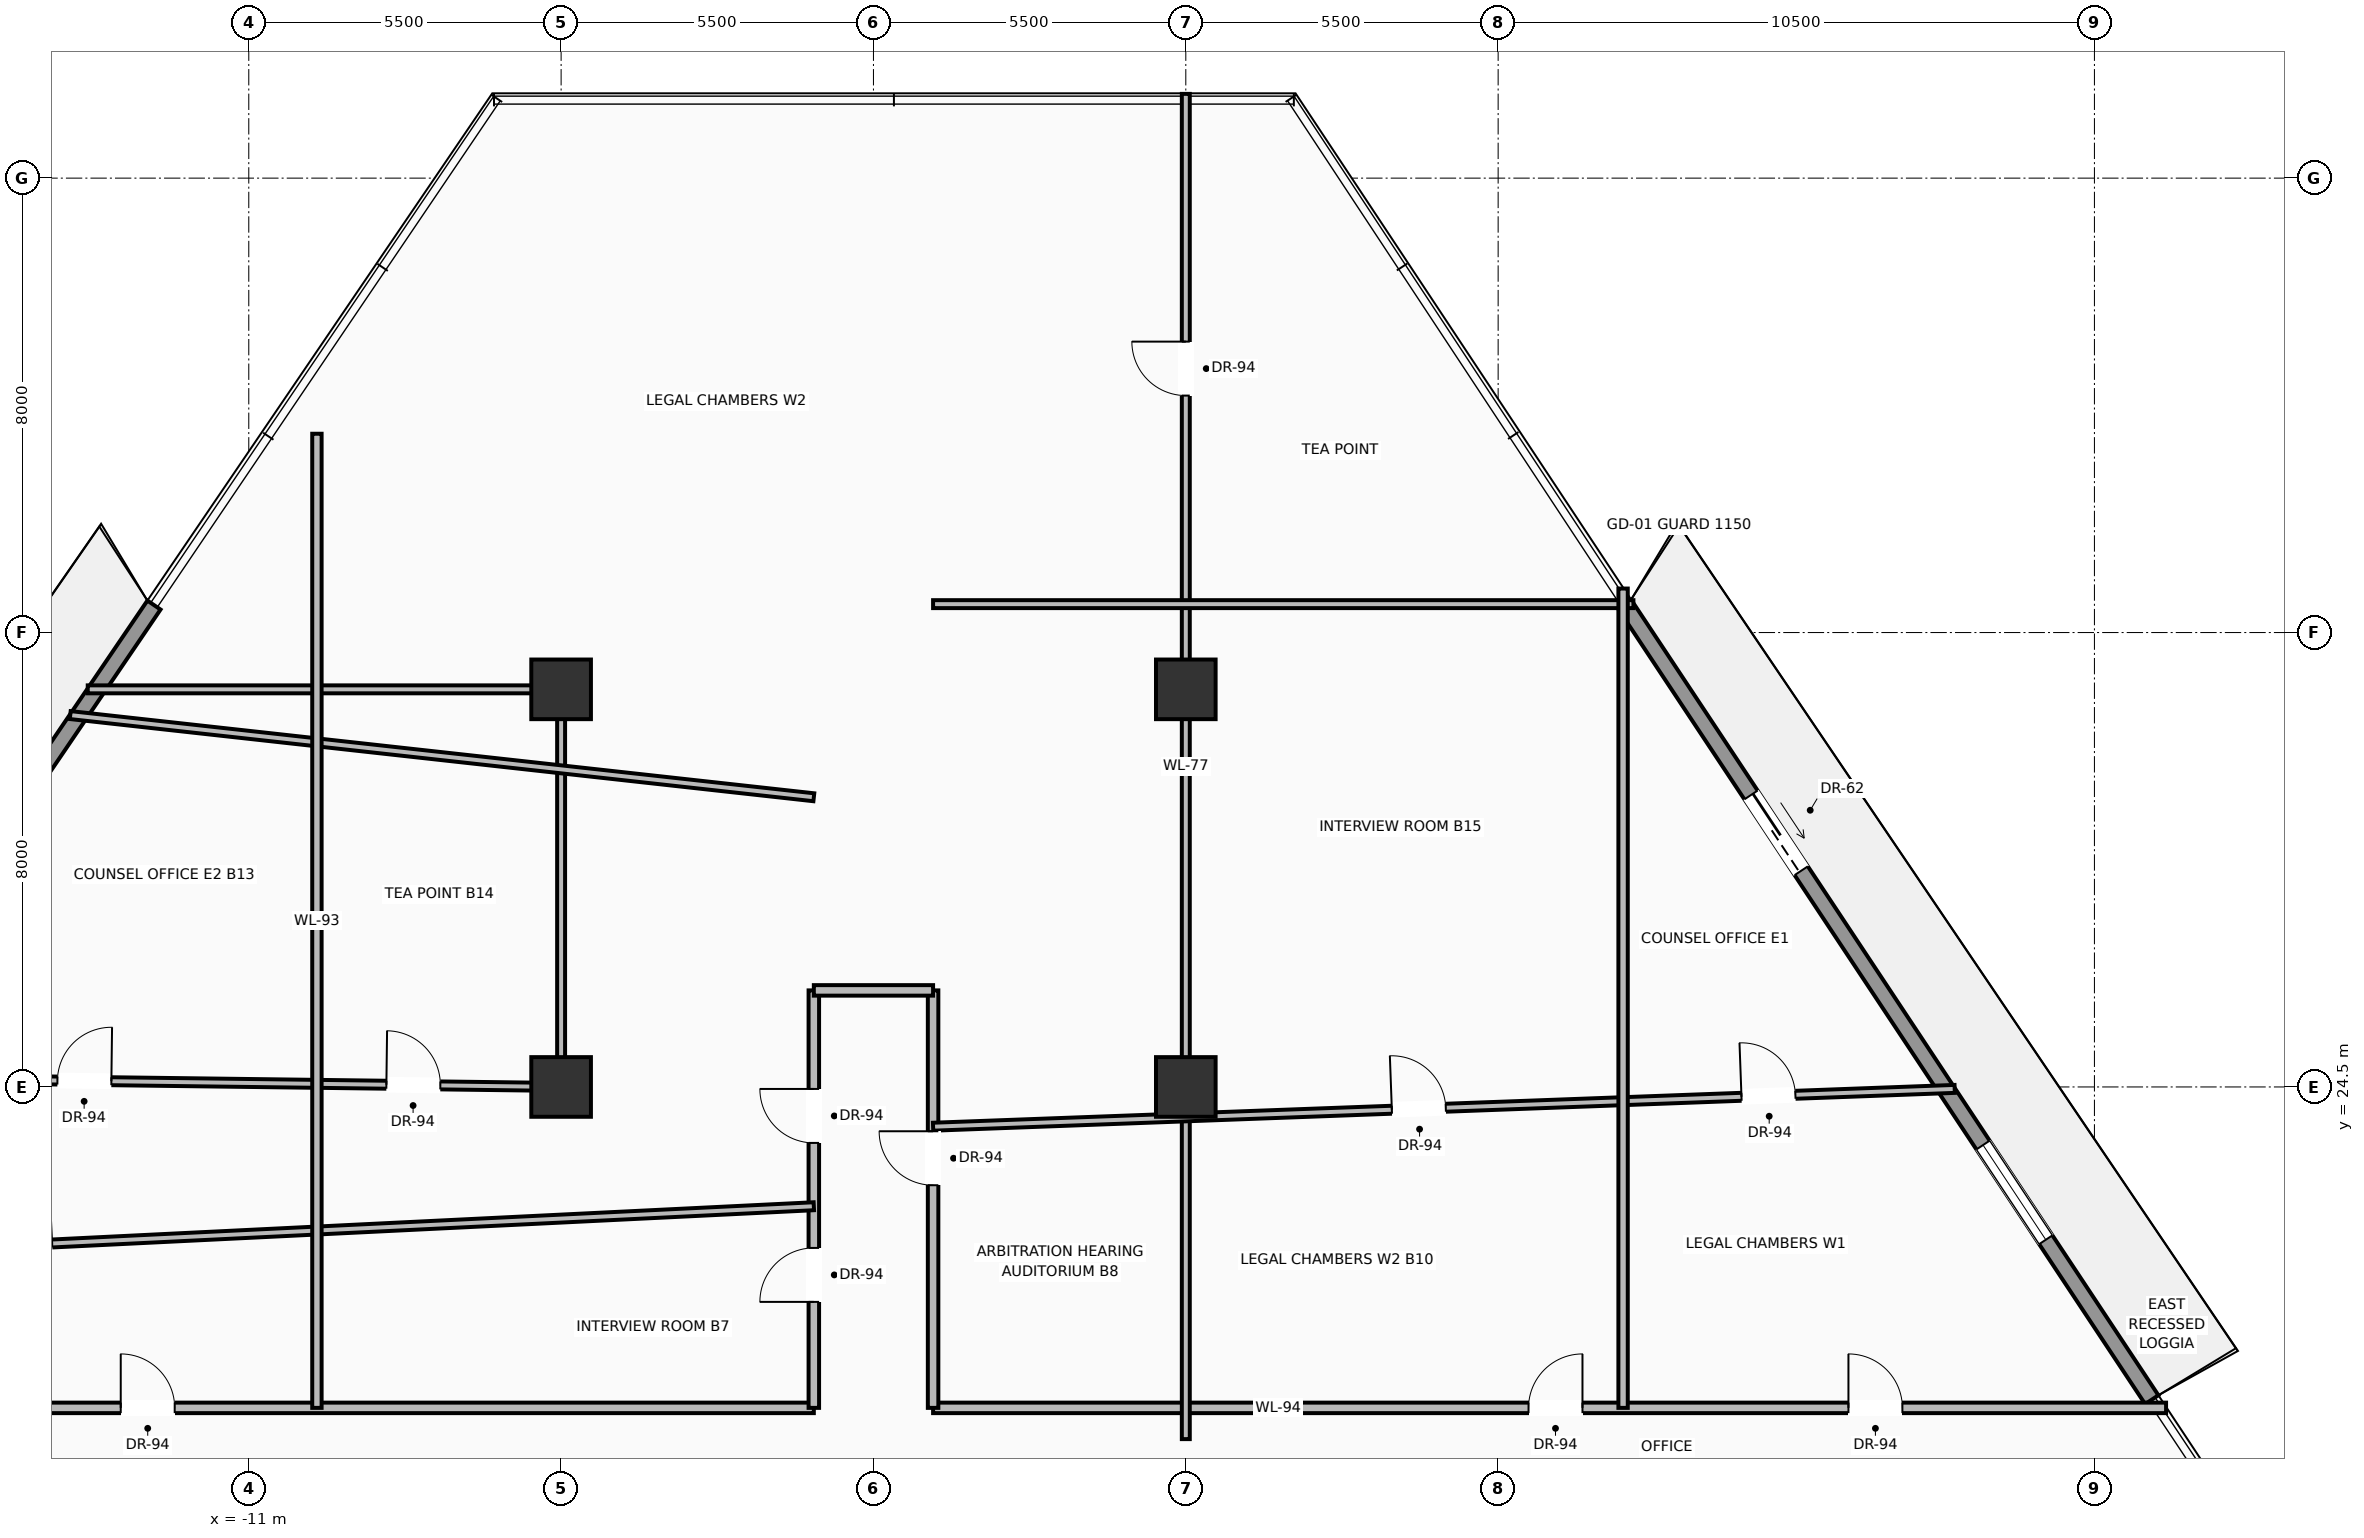
"""IFC4 building model, lengths in metres.
Left out: names, types, materials, properties, quantities, classifications, styles, units other than length and angle.
Written with IfcOpenShell. Run it as: python <this file> out.ifc"""

import sys

from ifc_helpers import new_model, si_unit, direction, frame, frame_2d, origin, origin_2d, place, context, subcontext, project, spatial, rectangle, extrude, source, transform, mapped, element, fill, save


model = new_model("IFC4")
c1 = context("Model", 3, precision=1e-05, world=origin(), true_north=direction((0.0, 1.0)))
c2 = subcontext(c1, "Body", "Model", "MODEL_VIEW")
j1 = project(units=[si_unit("LENGTHUNIT", "METRE"), si_unit("PLANEANGLEUNIT", "RADIAN")], contexts=[c1])
p1 = place(None, origin())
s1 = spatial("IfcSite", under=j1, at=p1, CompositionType="ELEMENT")
p2 = place(p1, origin())
s2 = spatial("IfcBuilding", under=s1, at=p2, CompositionType="ELEMENT")
p3 = place(p2, frame((0.0, 0.0, 60.8)))
s3 = spatial("IfcBuildingStorey", under=s2, at=p3, CompositionType="ELEMENT", Elevation=60.8)
m1 = source(origin(), c2, "Body", "SweptSolid", [
    extrude(rectangle(XDim=1.05, YDim=1.05, at=origin_2d()), origin(), (0.0, 0.0, 1.0), 3.7),
])
for number, where, z_axis, x_axis in (
    (1, (-5.5, 24.5, 0.0), (0.0, 0.0, 1.0), (1.0, 0.0, 0.0)),
    (2, (5.5, 24.5, 0.0), (0.0, 0.0, 1.0), (1.0, 0.0, 0.0)),
    (3, (-5.5, 31.5, 0.0), (0.0, 0.0, 1.0), (1.0, 0.0, 0.0)),
    (4, (5.5, 31.5, 0.0), (0.0, 0.0, 1.0), (1.0, 0.0, 0.0)),
):
    element("IfcColumn", number, at=place(p3, frame(where, z_axis=z_axis, x_axis=x_axis)), inside=s3, PredefinedType="COLUMN", context=c2, shape_type="MappedRepresentation", body=[
        mapped(m1, transform((0.0, 0.0, 0.0), scale=1.0)),
    ])
p4 = place(p3, frame((-22.213, 18.95, 0.0), z_axis=(0.0, 0.0, 1.0), x_axis=(0.562325366789, 0.826916067002, 0.0)))
e5 = element("IfcWall", 5, at=p4, inside=s3, PredefinedType="SOLIDWALL", context=c2, shape_type="SweptSolid", body=[
    extrude(rectangle(XDim=16.971, YDim=0.28, at=frame_2d((8.486, 0.0))), origin(), (0.0, 0.0, 1.0), 3.03),
])
p5 = place(p4, frame((4.073, 0.0, 0.0)))
e6 = element("IfcOpeningElement", 6, at=p5, cuts=e5, PredefinedType="OPENING", context=c2, shape_type="SweptSolid", body=[
    extrude(rectangle(XDim=1.6, YDim=2.35, at=frame_2d((0.8, 1.175))), frame((0.0, 0.15, 0.0), z_axis=(0.0, -1.0, 0.0), x_axis=(1.0, 0.0, 0.0)), (0.0, 0.0, 1.0), 0.3),
])
p6 = place(p4, frame((11.541, 0.0, 0.9)))
e7 = element("IfcOpeningElement", 7, at=p6, cuts=e5, PredefinedType="OPENING", context=c2, shape_type="SweptSolid", body=[
    extrude(rectangle(XDim=2.0, YDim=1.85, at=frame_2d((1.0, 0.925))), frame((0.0, 0.15, 0.0), z_axis=(0.0, -1.0, 0.0), x_axis=(1.0, 0.0, 0.0)), (0.0, 0.0, 1.0), 0.3),
])
p7 = place(p3, frame((13.225, 33.002, 0.0), z_axis=(0.0, 0.0, 1.0), x_axis=(0.552505751784, -0.833509084681, 0.0)))
e8 = element("IfcWall", 8, at=p7, inside=s3, PredefinedType="SOLIDWALL", context=c2, shape_type="SweptSolid", body=[
    extrude(rectangle(XDim=16.805, YDim=0.28, at=frame_2d((8.403, 0.0))), origin(), (0.0, 0.0, 1.0), 3.03),
])
p8 = place(p7, frame((4.033, 0.0, 0.0)))
e9 = element("IfcOpeningElement", 9, at=p8, cuts=e8, PredefinedType="OPENING", context=c2, shape_type="SweptSolid", body=[
    extrude(rectangle(XDim=1.6, YDim=2.35, at=frame_2d((0.8, 1.175))), frame((0.0, 0.15, 0.0), z_axis=(0.0, -1.0, 0.0), x_axis=(1.0, 0.0, 0.0)), (0.0, 0.0, 1.0), 0.3),
])
p9 = place(p7, frame((11.428, 0.0, 0.9)))
e10 = element("IfcOpeningElement", 10, at=p9, cuts=e8, PredefinedType="OPENING", context=c2, shape_type="SweptSolid", body=[
    extrude(rectangle(XDim=2.0, YDim=1.85, at=frame_2d((1.0, 0.925))), frame((0.0, 0.15, 0.0), z_axis=(0.0, -1.0, 0.0), x_axis=(1.0, 0.0, 0.0)), (0.0, 0.0, 1.0), 0.3),
])
p10 = place(p3, frame((-22.438, 18.85, 0.0), z_axis=(0.0, 0.0, 1.0), x_axis=(1.0, 0.0, 0.0)))
e11 = element("IfcWall", 11, at=p10, inside=s3, PredefinedType="PARTITIONING", context=c2, shape_type="SweptSolid", body=[
    extrude(rectangle(XDim=21.388, YDim=0.185, at=frame_2d((10.694, 0.0))), origin(), (0.0, 0.0, 1.0), 2.747),
])
p11 = place(p10, frame((9.184, 0.0, 0.0)))
e12 = element("IfcOpeningElement", 12, at=p11, cuts=e11, PredefinedType="OPENING", context=c2, shape_type="SweptSolid", body=[
    extrude(rectangle(XDim=0.95, YDim=2.2, at=frame_2d((0.475, 1.1))), frame((0.0, 0.103, 0.0), z_axis=(0.0, -1.0, 0.0), x_axis=(1.0, 0.0, 0.0)), (0.0, 0.0, 1.0), 0.205),
])
p12 = place(p3, frame((1.05, 18.85, 0.0), z_axis=(0.0, 0.0, 1.0), x_axis=(1.0, 0.0, 0.0)))
e13 = element("IfcWall", 13, at=p12, inside=s3, PredefinedType="PARTITIONING", context=c2, shape_type="SweptSolid", body=[
    extrude(rectangle(XDim=21.712, YDim=0.185, at=frame_2d((10.856, 0.0))), origin(), (0.0, 0.0, 1.0), 2.747),
])
p13 = place(p12, frame((10.485, 0.0, 0.0)))
e14 = element("IfcOpeningElement", 14, at=p13, cuts=e13, PredefinedType="OPENING", context=c2, shape_type="SweptSolid", body=[
    extrude(rectangle(XDim=0.95, YDim=2.2, at=frame_2d((0.475, 1.1))), frame((0.0, 0.103, 0.0), z_axis=(0.0, -1.0, 0.0), x_axis=(1.0, 0.0, 0.0)), (0.0, 0.0, 1.0), 0.205),
])
p14 = place(p12, frame((16.118, 0.0, 0.0)))
e15 = element("IfcOpeningElement", 15, at=p14, cuts=e13, PredefinedType="OPENING", context=c2, shape_type="SweptSolid", body=[
    extrude(rectangle(XDim=0.95, YDim=2.2, at=frame_2d((0.475, 1.1))), frame((0.0, 0.103, 0.0), z_axis=(0.0, -1.0, 0.0), x_axis=(1.0, 0.0, 0.0)), (0.0, 0.0, 1.0), 0.205),
])
p15 = place(p3, frame((-1.05, 18.85, 0.0), z_axis=(0.0, 0.0, 1.0), x_axis=(0.0, 1.0, 0.0)))
e16 = element("IfcWall", 16, at=p15, inside=s3, PredefinedType="PARTITIONING", context=c2, shape_type="SweptSolid", body=[
    extrude(rectangle(XDim=7.35, YDim=0.185, at=frame_2d((3.675, 0.0))), origin(), (0.0, 0.0, 1.0), 2.747),
])
p16 = place(p15, frame((1.866, 0.0, 0.0)))
e17 = element("IfcOpeningElement", 17, at=p16, cuts=e16, PredefinedType="OPENING", context=c2, shape_type="SweptSolid", body=[
    extrude(rectangle(XDim=0.95, YDim=2.2, at=frame_2d((0.475, 1.1))), frame((0.0, 0.103, 0.0), z_axis=(0.0, -1.0, 0.0), x_axis=(1.0, 0.0, 0.0)), (0.0, 0.0, 1.0), 0.205),
])
p17 = place(p15, frame((4.665, 0.0, 0.0)))
e18 = element("IfcOpeningElement", 18, at=p17, cuts=e16, PredefinedType="OPENING", context=c2, shape_type="SweptSolid", body=[
    extrude(rectangle(XDim=0.95, YDim=2.2, at=frame_2d((0.475, 1.1))), frame((0.0, 0.103, 0.0), z_axis=(0.0, -1.0, 0.0), x_axis=(1.0, 0.0, 0.0)), (0.0, 0.0, 1.0), 0.205),
])
p18 = place(p3, frame((1.05, 18.85, 0.0), z_axis=(0.0, 0.0, 1.0), x_axis=(0.0, 1.0, 0.0)))
e19 = element("IfcWall", 19, at=p18, inside=s3, PredefinedType="PARTITIONING", context=c2, shape_type="SweptSolid", body=[
    extrude(rectangle(XDim=7.35, YDim=0.185, at=frame_2d((3.675, 0.0))), origin(), (0.0, 0.0, 1.0), 2.747),
])
p19 = place(p18, frame((3.92, 0.0, 0.0)))
e20 = element("IfcOpeningElement", 20, at=p19, cuts=e19, PredefinedType="OPENING", context=c2, shape_type="SweptSolid", body=[
    extrude(rectangle(XDim=0.95, YDim=2.2, at=frame_2d((0.475, 1.1))), frame((0.0, 0.103, 0.0), z_axis=(0.0, -1.0, 0.0), x_axis=(1.0, 0.0, 0.0)), (0.0, 0.0, 1.0), 0.205),
])
p20 = place(p3, frame((-1.05, 26.2, 0.0), z_axis=(0.0, 0.0, 1.0), x_axis=(1.0, 0.0, 0.0)))
e21 = element("IfcWall", 21, at=p20, inside=s3, PredefinedType="PARTITIONING", context=c2, shape_type="SweptSolid", body=[
    extrude(rectangle(XDim=2.1, YDim=0.185, at=frame_2d((1.05, 0.0))), origin(), (0.0, 0.0, 1.0), 3.442),
])
p21 = place(p3, frame((5.5, 18.3, 0.0), z_axis=(0.0, 0.0, 1.0), x_axis=(0.0, 1.0, 0.0)))
e22 = element("IfcWall", 22, at=p21, inside=s3, PredefinedType="PARTITIONING", context=c2, shape_type="SweptSolid", body=[
    extrude(rectangle(XDim=23.683, YDim=0.14, at=frame_2d((11.842, 0.0))), origin(), (0.0, 0.0, 1.0), 2.747),
])
p22 = place(p21, frame((18.372, 0.0, 0.0)))
e23 = element("IfcOpeningElement", 23, at=p22, cuts=e22, PredefinedType="OPENING", context=c2, shape_type="SweptSolid", body=[
    extrude(rectangle(XDim=0.95, YDim=2.2, at=frame_2d((0.475, 1.1))), frame((0.0, 0.08, 0.0), z_axis=(0.0, -1.0, 0.0), x_axis=(1.0, 0.0, 0.0)), (0.0, 0.0, 1.0), 0.16),
])
p23 = place(p3, frame((-18.483, 24.665, 0.0), z_axis=(0.0, 0.0, 1.0), x_axis=(0.999918978945, -0.012729318329, 0.0)))
e24 = element("IfcWall", 24, at=p23, inside=s3, PredefinedType="PARTITIONING", context=c2, shape_type="SweptSolid", body=[
    extrude(rectangle(XDim=12.984, YDim=0.14, at=frame_2d((6.492, 0.0))), origin(), (0.0, 0.0, 1.0), 2.747),
])
p24 = place(p23, frame((4.115, 0.0, 0.0)))
e25 = element("IfcOpeningElement", 25, at=p24, cuts=e24, PredefinedType="OPENING", context=c2, shape_type="SweptSolid", body=[
    extrude(rectangle(XDim=0.95, YDim=2.2, at=frame_2d((0.475, 1.1))), frame((0.0, 0.08, 0.0), z_axis=(0.0, -1.0, 0.0), x_axis=(1.0, 0.0, 0.0)), (0.0, 0.0, 1.0), 0.16),
])
p25 = place(p23, frame((9.907, 0.0, 0.0)))
e26 = element("IfcOpeningElement", 26, at=p25, cuts=e24, PredefinedType="OPENING", context=c2, shape_type="SweptSolid", body=[
    extrude(rectangle(XDim=0.95, YDim=2.2, at=frame_2d((0.475, 1.1))), frame((0.0, 0.08, 0.0), z_axis=(0.0, -1.0, 0.0), x_axis=(1.0, 0.0, 0.0)), (0.0, 0.0, 1.0), 0.16),
])
p26 = place(p3, frame((-5.5, 24.5, 0.0), z_axis=(0.0, 0.0, 1.0), x_axis=(0.0, 1.0, 0.0)))
e27 = element("IfcWall", 27, at=p26, inside=s3, PredefinedType="PARTITIONING", context=c2, shape_type="SweptSolid", body=[
    extrude(rectangle(XDim=7.0, YDim=0.14, at=frame_2d((3.5, 0.0))), origin(), (0.0, 0.0, 1.0), 2.747),
])
p27 = place(p3, frame((-13.836, 31.5, 0.0), z_axis=(0.0, 0.0, 1.0), x_axis=(1.0, 0.0, 0.0)))
e28 = element("IfcWall", 28, at=p27, inside=s3, PredefinedType="PARTITIONING", context=c2, shape_type="SweptSolid", body=[
    extrude(rectangle(XDim=8.336, YDim=0.14, at=frame_2d((4.168, 0.0))), origin(), (0.0, 0.0, 1.0), 2.747),
])
p28 = place(p3, frame((-20.677, 21.44, 0.0), z_axis=(0.0, 0.0, 1.0), x_axis=(0.998806577977, 0.048840759523, 0.0)))
e29 = element("IfcWall", 29, at=p28, inside=s3, PredefinedType="PARTITIONING", context=c2, shape_type="SweptSolid", body=[
    extrude(rectangle(XDim=19.65, YDim=0.14, at=frame_2d((9.825, 0.0))), origin(), (0.0, 0.0, 1.0), 2.747),
])
p29 = place(p28, frame((5.271, 0.0, 0.0)))
e30 = element("IfcOpeningElement", 30, at=p29, cuts=e29, PredefinedType="OPENING", context=c2, shape_type="SweptSolid", body=[
    extrude(rectangle(XDim=0.95, YDim=2.2, at=frame_2d((0.475, 1.1))), frame((0.0, 0.08, 0.0), z_axis=(0.0, -1.0, 0.0), x_axis=(1.0, 0.0, 0.0)), (0.0, 0.0, 1.0), 0.16),
])
p30 = place(p3, frame((-14.144, 31.047, 0.0), z_axis=(0.0, 0.0, 1.0), x_axis=(0.993950900721, -0.10982534751, 0.0)))
e31 = element("IfcWall", 31, at=p30, inside=s3, PredefinedType="PARTITIONING", context=c2, shape_type="SweptSolid", body=[
    extrude(rectangle(XDim=13.173, YDim=0.14, at=frame_2d((6.587, 0.0))), origin(), (0.0, 0.0, 1.0), 2.747),
])
p31 = place(p3, frame((1.05, 23.8, 0.0), z_axis=(0.0, 0.0, 1.0), x_axis=(0.999315836643, 0.036984572921, 0.0)))
e32 = element("IfcWall", 32, at=p31, inside=s3, PredefinedType="PARTITIONING", context=c2, shape_type="SweptSolid", body=[
    extrude(rectangle(XDim=18.001, YDim=0.14, at=frame_2d((9.0, 0.0))), origin(), (0.0, 0.0, 1.0), 2.747),
])
p32 = place(p31, frame((8.084, 0.0, 0.0)))
e33 = element("IfcOpeningElement", 33, at=p32, cuts=e32, PredefinedType="OPENING", context=c2, shape_type="SweptSolid", body=[
    extrude(rectangle(XDim=0.95, YDim=2.2, at=frame_2d((0.475, 1.1))), frame((0.0, 0.08, 0.0), z_axis=(0.0, -1.0, 0.0), x_axis=(1.0, 0.0, 0.0)), (0.0, 0.0, 1.0), 0.16),
])
p33 = place(p31, frame((14.245, 0.0, 0.0)))
e34 = element("IfcOpeningElement", 34, at=p33, cuts=e32, PredefinedType="OPENING", context=c2, shape_type="SweptSolid", body=[
    extrude(rectangle(XDim=0.95, YDim=2.2, at=frame_2d((0.475, 1.1))), frame((0.0, 0.08, 0.0), z_axis=(0.0, -1.0, 0.0), x_axis=(1.0, 0.0, 0.0)), (0.0, 0.0, 1.0), 0.16),
])
p34 = place(p3, frame((1.05, 33.0, 0.0), z_axis=(0.0, 0.0, 1.0), x_axis=(1.0, 0.0, 0.0)))
e35 = element("IfcWall", 35, at=p34, inside=s3, PredefinedType="PARTITIONING", context=c2, shape_type="SweptSolid", body=[
    extrude(rectangle(XDim=12.332, YDim=0.14, at=frame_2d((6.166, 0.0))), origin(), (0.0, 0.0, 1.0), 2.747),
])
p35 = place(p3, frame((-9.8, 18.85, 0.0), z_axis=(0.0, 0.0, 1.0), x_axis=(0.0, 1.0, 0.0)))
e36 = element("IfcWall", 36, at=p35, inside=s3, PredefinedType="PARTITIONING", context=c2, shape_type="SweptSolid", body=[
    extrude(rectangle(XDim=17.15, YDim=0.165, at=frame_2d((8.575, 0.0))), origin(), (0.0, 0.0, 1.0), 2.747),
])
p36 = place(p3, frame((13.2, 18.85, 0.0), z_axis=(0.0, 0.0, 1.0), x_axis=(0.0, 1.0, 0.0)))
e37 = element("IfcWall", 37, at=p36, inside=s3, PredefinedType="PARTITIONING", context=c2, shape_type="SweptSolid", body=[
    extrude(rectangle(XDim=14.425, YDim=0.165, at=frame_2d((7.212, 0.0))), origin(), (0.0, 0.0, 1.0), 2.747),
])
m2 = source(origin(), c2, "Body", "SweptSolid", [
    extrude(rectangle(XDim=1.6, YDim=2.35, at=frame_2d((0.8, 1.175))), frame((0.0, 0.025, 0.0), z_axis=(0.0, -1.0, 0.0), x_axis=(1.0, 0.0, 0.0)), (0.0, 0.0, 1.0), 0.05),
])
p37 = place(p8, origin())
e38 = element("IfcDoor", 38, at=p37, inside=s3, OperationType="SLIDING_TO_RIGHT", PredefinedType="DOOR", context=c2, shape_type="MappedRepresentation", body=[
    mapped(m2, transform((0.0, 0.0, 0.0), scale=1.0)),
])
fill(e9, e38)
m3 = source(origin(), c2, "Body", "SweptSolid", [
    extrude(rectangle(XDim=2.0, YDim=1.85, at=frame_2d((1.0, 0.925))), frame((0.0, 0.03, 0.0), z_axis=(0.0, -1.0, 0.0), x_axis=(1.0, 0.0, 0.0)), (0.0, 0.0, 1.0), 0.06),
])
p38 = place(p9, origin())
e39 = element("IfcWindow", 39, at=p38, inside=s3, PartitioningType="SINGLE_PANEL", PredefinedType="WINDOW", context=c2, shape_type="MappedRepresentation", body=[
    mapped(m3, transform((0.0, 0.0, 0.0), scale=1.0)),
])
fill(e10, e39)
m4 = source(origin(), c2, "Body", "SweptSolid", [
    extrude(rectangle(XDim=0.95, YDim=2.2, at=frame_2d((0.475, 1.1))), frame((0.0, 0.025, 0.0), z_axis=(0.0, -1.0, 0.0), x_axis=(1.0, 0.0, 0.0)), (0.0, 0.0, 1.0), 0.05),
])
p39 = place(p11, origin())
e40 = element("IfcDoor", 40, at=p39, inside=s3, OperationType="SINGLE_SWING_LEFT", PredefinedType="DOOR", context=c2, shape_type="MappedRepresentation", body=[
    mapped(m4, transform((0.0, 0.0, 0.0), scale=1.0)),
])
fill(e12, e40)
p40 = place(p13, origin())
e41 = element("IfcDoor", 41, at=p40, inside=s3, OperationType="SINGLE_SWING_RIGHT", PredefinedType="DOOR", context=c2, shape_type="MappedRepresentation", body=[
    mapped(m4, transform((0.0, 0.0, 0.0), scale=1.0)),
])
fill(e14, e41)
p41 = place(p16, origin())
e42 = element("IfcDoor", 42, at=p41, inside=s3, OperationType="SINGLE_SWING_LEFT", PredefinedType="DOOR", context=c2, shape_type="MappedRepresentation", body=[
    mapped(m4, transform((0.0, 0.0, 0.0), scale=1.0)),
])
fill(e17, e42)
p42 = place(p19, origin())
e43 = element("IfcDoor", 43, at=p42, inside=s3, OperationType="SINGLE_SWING_RIGHT", PredefinedType="DOOR", context=c2, shape_type="MappedRepresentation", body=[
    mapped(m4, transform((0.0, 0.0, 0.0), scale=1.0)),
])
fill(e20, e43)
p43 = place(p14, origin())
e44 = element("IfcDoor", 44, at=p43, inside=s3, OperationType="SINGLE_SWING_LEFT", PredefinedType="DOOR", context=c2, shape_type="MappedRepresentation", body=[
    mapped(m4, transform((0.0, 0.0, 0.0), scale=1.0)),
])
fill(e15, e44)
p44 = place(p32, origin())
e45 = element("IfcDoor", 45, at=p44, inside=s3, OperationType="SINGLE_SWING_LEFT", PredefinedType="DOOR", context=c2, shape_type="MappedRepresentation", body=[
    mapped(m4, transform((0.0, 0.0, 0.0), scale=1.0)),
])
fill(e33, e45)
p45 = place(p17, origin())
e46 = element("IfcDoor", 46, at=p45, inside=s3, OperationType="SINGLE_SWING_RIGHT", PredefinedType="DOOR", context=c2, shape_type="MappedRepresentation", body=[
    mapped(m4, transform((0.0, 0.0, 0.0), scale=1.0)),
])
fill(e18, e46)
p46 = place(p33, origin())
e47 = element("IfcDoor", 47, at=p46, inside=s3, OperationType="SINGLE_SWING_LEFT", PredefinedType="DOOR", context=c2, shape_type="MappedRepresentation", body=[
    mapped(m4, transform((0.0, 0.0, 0.0), scale=1.0)),
])
fill(e34, e47)
p47 = place(p24, origin())
e48 = element("IfcDoor", 48, at=p47, inside=s3, OperationType="SINGLE_SWING_RIGHT", PredefinedType="DOOR", context=c2, shape_type="MappedRepresentation", body=[
    mapped(m4, transform((0.0, 0.0, 0.0), scale=1.0)),
])
fill(e25, e48)
p48 = place(p25, origin())
e49 = element("IfcDoor", 49, at=p48, inside=s3, OperationType="SINGLE_SWING_LEFT", PredefinedType="DOOR", context=c2, shape_type="MappedRepresentation", body=[
    mapped(m4, transform((0.0, 0.0, 0.0), scale=1.0)),
])
fill(e26, e49)
p49 = place(p22, origin())
e50 = element("IfcDoor", 50, at=p49, inside=s3, OperationType="SINGLE_SWING_RIGHT", PredefinedType="DOOR", context=c2, shape_type="MappedRepresentation", body=[
    mapped(m4, transform((0.0, 0.0, 0.0), scale=1.0)),
])
fill(e23, e50)
save(model, sys.argv[1])
